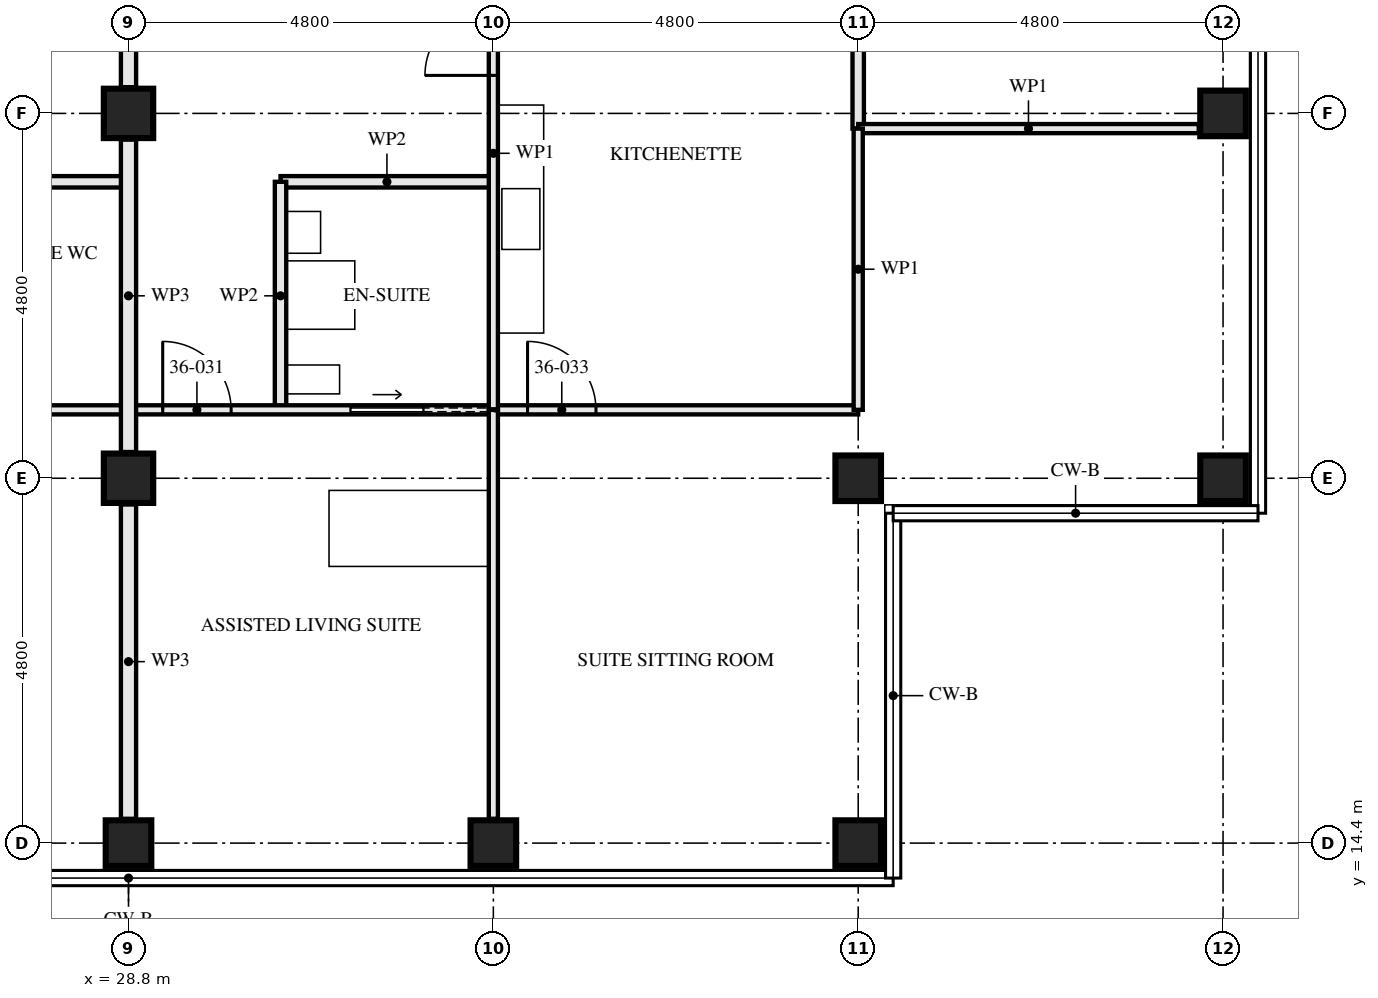
"""IFC4 building model, lengths in metres.
Left out: names, types, materials, properties, quantities, classifications, styles, units other than length and angle.
Written with IfcOpenShell. Run it as: python <this file> out.ifc"""

import sys

from ifc_helpers import new_model, si_unit, direction, frame, frame_2d, origin, origin_2d, place, context, subcontext, project, spatial, rectangle, hollow_rectangle, extrude, element, fill, save


model = new_model("IFC4")
c1 = context("Model", 3, precision=1e-05, world=origin(), true_north=direction((0.0, 1.0)))
c2 = subcontext(c1, "Body", "Model", "MODEL_VIEW")
j1 = project(units=[si_unit("LENGTHUNIT", "METRE"), si_unit("PLANEANGLEUNIT", "RADIAN")], contexts=[c1])
p1 = place(None, origin())
s1 = spatial("IfcSite", under=j1, at=p1, CompositionType="ELEMENT")
p2 = place(p1, origin())
s2 = spatial("IfcBuilding", under=s1, at=p2, CompositionType="ELEMENT")
p3 = place(p2, frame((0.0, 0.0, 133.0)))
s3 = spatial("IfcBuildingStorey", under=s2, at=p3, CompositionType="ELEMENT", Elevation=133.0)
p4 = place(p3, frame((28.8, 14.4, 0.0), z_axis=(0.0, 0.0, 1.0), x_axis=(0.0, 1.0, 0.0)))
e1 = element("IfcColumn", 1, at=p4, inside=s3, PredefinedType="COLUMN", context=c2, shape_type="SweptSolid", body=[
    extrude(hollow_rectangle(XDim=0.6, YDim=0.6, WallThickness=0.08, at=origin_2d()), origin(), (0.0, 0.0, 1.0), 3.5),
])
for number, where, z_axis, x_axis in (
    (2, (28.8, 19.2, 0.0), (0.0, 0.0, 1.0), (1.0, 0.0, 0.0)),
    (3, (28.8, 24.0, 0.0), (0.0, 0.0, 1.0), (1.0, 0.0, 0.0)),
):
    element("IfcColumn", number, at=place(p3, frame(where, z_axis=z_axis, x_axis=x_axis)), inside=s3, PredefinedType="COLUMN", context=c2, shape_type="SweptSolid", body=[
        extrude(hollow_rectangle(XDim=0.65, YDim=0.65, WallThickness=0.05, at=origin_2d()), origin(), (0.0, 0.0, 1.0), 3.5),
    ])
for number, where, z_axis, x_axis in (
    (4, (33.6, 14.4, 0.0), (0.0, 0.0, 1.0), (0.0, 1.0, 0.0)),
    (5, (38.4, 14.4, 0.0), (0.0, 0.0, 1.0), (0.0, 1.0, 0.0)),
    (6, (38.4, 19.2, 0.0), (0.0, 0.0, 1.0), (0.0, 1.0, 0.0)),
    (7, (43.2, 19.2, 0.0), (0.0, 0.0, 1.0), (0.0, 1.0, 0.0)),
    (8, (43.2, 24.0, 0.0), (0.0, 0.0, 1.0), (1.0, 0.0, 0.0)),
):
    element("IfcColumn", number, at=place(p3, frame(where, z_axis=z_axis, x_axis=x_axis)), inside=s3, PredefinedType="COLUMN", context=c2, shape_type="SweptSolid", body=[
        extrude(hollow_rectangle(XDim=0.6, YDim=0.6, WallThickness=0.08, at=origin_2d()), origin(), (0.0, 0.0, 1.0), 3.5),
    ])
p5 = place(p3, frame((26.0, 23.1, 0.0), z_axis=(0.0, 0.0, 1.0), x_axis=(1.0, 0.0, 0.0)))
e9 = element("IfcWall", 9, at=p5, inside=s3, PredefinedType="PARTITIONING", context=c2, shape_type="SweptSolid", body=[
    extrude(rectangle(XDim=2.8, YDim=0.15, at=frame_2d((1.4, 0.0))), origin(), (0.0, 0.0, 1.0), 3.25),
])
p6 = place(p3, frame((24.0, 20.1, 0.0), z_axis=(0.0, 0.0, 1.0), x_axis=(1.0, 0.0, 0.0)))
e10 = element("IfcWall", 10, at=p6, inside=s3, PredefinedType="PARTITIONING", context=c2, shape_type="SweptSolid", body=[
    extrude(rectangle(XDim=4.8, YDim=0.12, at=frame_2d((2.4, 0.0))), origin(), (0.0, 0.0, 1.0), 3.25),
])
p7 = place(p3, frame((30.8, 20.1, 0.0), z_axis=(0.0, 0.0, 1.0), x_axis=(0.0, 1.0, 0.0)))
e11 = element("IfcWall", 11, at=p7, inside=s3, PredefinedType="PARTITIONING", context=c2, shape_type="SweptSolid", body=[
    extrude(rectangle(XDim=3.0, YDim=0.15, at=frame_2d((1.5, 0.0))), origin(), (0.0, 0.0, 1.0), 3.25),
])
p8 = place(p3, frame((30.8, 23.1, 0.0), z_axis=(0.0, 0.0, 1.0), x_axis=(1.0, 0.0, 0.0)))
e12 = element("IfcWall", 12, at=p8, inside=s3, PredefinedType="PARTITIONING", context=c2, shape_type="SweptSolid", body=[
    extrude(rectangle(XDim=2.8, YDim=0.15, at=frame_2d((1.4, 0.0))), origin(), (0.0, 0.0, 1.0), 3.25),
])
p9 = place(p3, frame((38.4, 23.8, 0.0), z_axis=(0.0, 0.0, 1.0), x_axis=(0.0, 1.0, 0.0)))
e13 = element("IfcWall", 13, at=p9, inside=s3, PredefinedType="PARTITIONING", context=c2, shape_type="SweptSolid", body=[
    extrude(rectangle(XDim=3.0, YDim=0.15, at=frame_2d((1.5, 0.0))), origin(), (0.0, 0.0, 1.0), 2.04),
])
p10 = place(p9, frame((1.05, 0.0, 0.0)))
e14 = element("IfcOpeningElement", 14, at=p10, cuts=e13, PredefinedType="OPENING", context=c2, shape_type="SweptSolid", body=[
    extrude(rectangle(XDim=0.9, YDim=2.0, at=frame_2d((0.45, 1.0))), frame((0.0, 0.085, 0.0), z_axis=(0.0, -1.0, 0.0), x_axis=(1.0, 0.0, 0.0)), (0.0, 0.0, 1.0), 0.171),
])
p11 = place(p3, frame((33.6, 20.1, 0.0), z_axis=(0.0, 0.0, 1.0), x_axis=(0.0, 1.0, 0.0)))
e15 = element("IfcWall", 15, at=p11, inside=s3, PredefinedType="PARTITIONING", context=c2, shape_type="SweptSolid", body=[
    extrude(rectangle(XDim=6.75, YDim=0.12, at=frame_2d((3.375, 0.0))), origin(), (0.0, 0.0, 1.0), 2.04),
])
p12 = place(p11, frame((4.4, 0.0, 0.0)))
e16 = element("IfcOpeningElement", 16, at=p12, cuts=e15, PredefinedType="OPENING", context=c2, shape_type="SweptSolid", body=[
    extrude(rectangle(XDim=0.9, YDim=2.0, at=frame_2d((0.45, 1.0))), frame((0.0, 0.071, 0.0), z_axis=(0.0, -1.0, 0.0), x_axis=(1.0, 0.0, 0.0)), (0.0, 0.0, 1.0), 0.141),
])
p13 = place(p3, frame((28.8, 20.1, 0.0), z_axis=(0.0, 0.0, 1.0), x_axis=(1.0, 0.0, 0.0)))
e17 = element("IfcWall", 17, at=p13, inside=s3, PredefinedType="PARTITIONING", context=c2, shape_type="SweptSolid", body=[
    extrude(rectangle(XDim=4.8, YDim=0.12, at=frame_2d((2.4, 0.0))), origin(), (0.0, 0.0, 1.0), 3.25),
])
p14 = place(p13, frame((0.45, 0.0, 0.0)))
e18 = element("IfcOpeningElement", 18, at=p14, cuts=e17, PredefinedType="OPENING", context=c2, shape_type="SweptSolid", body=[
    extrude(rectangle(XDim=0.9, YDim=2.1, at=frame_2d((0.45, 1.05))), frame((0.0, 0.071, 0.0), z_axis=(0.0, -1.0, 0.0), x_axis=(1.0, 0.0, 0.0)), (0.0, 0.0, 1.0), 0.141),
])
p15 = place(p13, frame((2.925, 0.0, 0.0)))
e19 = element("IfcOpeningElement", 19, at=p15, cuts=e17, PredefinedType="OPENING", context=c2, shape_type="SweptSolid", body=[
    extrude(rectangle(XDim=0.95, YDim=2.1, at=frame_2d((0.475, 1.05))), frame((0.0, 0.071, 0.0), z_axis=(0.0, -1.0, 0.0), x_axis=(1.0, 0.0, 0.0)), (0.0, 0.0, 1.0), 0.141),
])
p16 = place(p3, frame((33.6, 20.1, 0.0), z_axis=(0.0, 0.0, 1.0), x_axis=(1.0, 0.0, 0.0)))
e20 = element("IfcWall", 20, at=p16, inside=s3, PredefinedType="PARTITIONING", context=c2, shape_type="SweptSolid", body=[
    extrude(rectangle(XDim=4.8, YDim=0.12, at=frame_2d((2.4, 0.0))), origin(), (0.0, 0.0, 1.0), 3.25),
])
p17 = place(p16, frame((0.45, 0.0, 0.0)))
e21 = element("IfcOpeningElement", 21, at=p17, cuts=e20, PredefinedType="OPENING", context=c2, shape_type="SweptSolid", body=[
    extrude(rectangle(XDim=0.9, YDim=2.1, at=frame_2d((0.45, 1.05))), frame((0.0, 0.071, 0.0), z_axis=(0.0, -1.0, 0.0), x_axis=(1.0, 0.0, 0.0)), (0.0, 0.0, 1.0), 0.141),
])
p18 = place(p3, frame((38.4, 23.8, 0.0), z_axis=(0.0, 0.0, 1.0), x_axis=(1.0, 0.0, 0.0)))
e22 = element("IfcWall", 22, at=p18, inside=s3, PredefinedType="PARTITIONING", context=c2, shape_type="SweptSolid", body=[
    extrude(rectangle(XDim=4.48, YDim=0.12, at=frame_2d((2.24, 0.0))), origin(), (0.0, 0.0, 1.0), 2.04),
])
p19 = place(p3, frame((33.6, 14.72, 0.0), z_axis=(0.0, 0.0, 1.0), x_axis=(0.0, 1.0, 0.0)))
e23 = element("IfcWall", 23, at=p19, inside=s3, PredefinedType="PARTITIONING", context=c2, shape_type="SweptSolid", body=[
    extrude(rectangle(XDim=5.38, YDim=0.12, at=frame_2d((2.69, 0.0))), origin(), (0.0, 0.0, 1.0), 2.24),
])
p20 = place(p3, frame((38.4, 20.1, 0.0), z_axis=(0.0, 0.0, 1.0), x_axis=(0.0, 1.0, 0.0)))
e24 = element("IfcWall", 24, at=p20, inside=s3, PredefinedType="PARTITIONING", context=c2, shape_type="SweptSolid", body=[
    extrude(rectangle(XDim=3.7, YDim=0.12, at=frame_2d((1.85, 0.0))), origin(), (0.0, 0.0, 1.0), 3.25),
])
p21 = place(p3, frame((28.8, 14.72, 0.0), z_axis=(0.0, 0.0, 1.0), x_axis=(0.0, 1.0, 0.0)))
e25 = element("IfcWall", 25, at=p21, inside=s3, PredefinedType="PARTITIONING", context=c2, shape_type="SweptSolid", body=[
    extrude(rectangle(XDim=4.135, YDim=0.2, at=frame_2d((2.067, 0.0))), origin(), (0.0, 0.0, 1.0), 2.04),
])
p22 = place(p3, frame((28.8, 19.545, 0.0), z_axis=(0.0, 0.0, 1.0), x_axis=(0.0, 1.0, 0.0)))
e26 = element("IfcWall", 26, at=p22, inside=s3, PredefinedType="PARTITIONING", context=c2, shape_type="SweptSolid", body=[
    extrude(rectangle(XDim=4.11, YDim=0.2, at=frame_2d((2.055, 0.0))), origin(), (0.0, 0.0, 1.0), 2.04),
])
p23 = place(p3, frame((28.8, 24.345, 0.0), z_axis=(0.0, 0.0, 1.0), x_axis=(0.0, 1.0, 0.0)))
e27 = element("IfcWall", 27, at=p23, inside=s3, PredefinedType="PARTITIONING", context=c2, shape_type="SweptSolid", body=[
    extrude(rectangle(XDim=2.555, YDim=0.2, at=frame_2d((1.277, 0.0))), origin(), (0.0, 0.0, 1.0), 2.04),
])
p24 = place(p12, origin())
e28 = element("IfcDoor", 28, at=p24, inside=s3, OperationType="SINGLE_SWING_RIGHT", PredefinedType="DOOR", context=c2, shape_type="SweptSolid", body=[
    extrude(rectangle(XDim=0.9, YDim=2.0, at=frame_2d((0.45, 1.0))), frame((0.0, 0.022, 0.0), z_axis=(0.0, -1.0, 0.0), x_axis=(1.0, 0.0, 0.0)), (0.0, 0.0, 1.0), 0.044),
])
fill(e16, e28)
p25 = place(p14, origin())
e29 = element("IfcDoor", 29, at=p25, inside=s3, OperationType="SINGLE_SWING_RIGHT", PredefinedType="DOOR", context=c2, shape_type="SweptSolid", body=[
    extrude(rectangle(XDim=0.9, YDim=2.1, at=frame_2d((0.45, 1.05))), frame((0.0, 0.022, 0.0), z_axis=(0.0, -1.0, 0.0), x_axis=(1.0, 0.0, 0.0)), (0.0, 0.0, 1.0), 0.044),
])
fill(e18, e29)
p26 = place(p15, origin())
e30 = element("IfcDoor", 30, at=p26, inside=s3, OperationType="SLIDING_TO_LEFT", PredefinedType="DOOR", context=c2, shape_type="SweptSolid", body=[
    extrude(rectangle(XDim=0.95, YDim=2.1, at=frame_2d((0.475, 1.05))), frame((0.0, 0.022, 0.0), z_axis=(0.0, -1.0, 0.0), x_axis=(1.0, 0.0, 0.0)), (0.0, 0.0, 1.0), 0.044),
])
fill(e19, e30)
p27 = place(p17, origin())
e31 = element("IfcDoor", 31, at=p27, inside=s3, OperationType="SINGLE_SWING_RIGHT", PredefinedType="DOOR", context=c2, shape_type="SweptSolid", body=[
    extrude(rectangle(XDim=0.9, YDim=2.1, at=frame_2d((0.45, 1.05))), frame((0.0, 0.022, 0.0), z_axis=(0.0, -1.0, 0.0), x_axis=(1.0, 0.0, 0.0)), (0.0, 0.0, 1.0), 0.044),
])
fill(e21, e31)
save(model, sys.argv[1])
